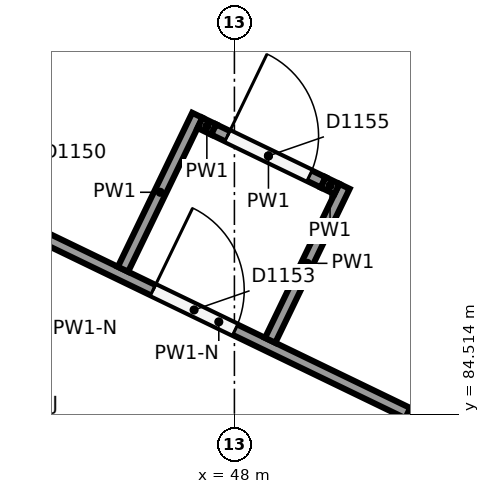
"""IFC4 building model, lengths in metres.
Left out: names, types, materials, properties, quantities, classifications, styles, units other than length and angle.
Written with IfcOpenShell. Run it as: python <this file> out.ifc"""

import sys

from ifc_helpers import new_model, si_unit, direction, frame, frame_2d, origin, place, context, subcontext, project, spatial, rectangle, extrude, element, fill, save


model = new_model("IFC4")
c1 = context("Model", 3, precision=1e-05, world=origin(), true_north=direction((0.0, 1.0)))
c2 = subcontext(c1, "Body", "Model", "MODEL_VIEW")
j1 = project(units=[si_unit("LENGTHUNIT", "METRE"), si_unit("PLANEANGLEUNIT", "RADIAN")], contexts=[c1])
p1 = place(None, origin())
s1 = spatial("IfcSite", under=j1, at=p1, CompositionType="ELEMENT")
p2 = place(p1, origin())
s2 = spatial("IfcBuilding", under=s1, at=p2, CompositionType="ELEMENT")
p3 = place(p2, frame((0.0, 0.0, 12.0)))
s3 = spatial("IfcBuildingStorey", under=s2, at=p3, CompositionType="ELEMENT", Elevation=12.0)
p4 = place(p3, frame((45.308, 86.931, 0.0), z_axis=(0.0, 0.0, 1.0), x_axis=(0.90052298219, -0.434808415911, 0.0)))
e1 = element("IfcWall", 1, at=p4, inside=s3, PredefinedType="PARTITIONING", context=c2, shape_type="SweptSolid", body=[
    extrude(rectangle(XDim=5.522, YDim=0.15, at=frame_2d((2.761, 0.0))), origin(), (0.0, 0.0, 1.0), 3.697),
])
p5 = place(p4, frame((1.8, 0.0, 0.0)))
e2 = element("IfcOpeningElement", 2, at=p5, cuts=e1, PredefinedType="OPENING", context=c2, shape_type="SweptSolid", body=[
    extrude(rectangle(XDim=1.2, YDim=2.1, at=frame_2d((0.6, 1.05))), frame((0.0, 0.085, 0.0), z_axis=(0.0, -1.0, 0.0), x_axis=(1.0, 0.0, 0.0)), (0.0, 0.0, 1.0), 0.17),
])
for number, where, z_axis, x_axis in (
    (3, (46.534, 86.423, 0.0), (0.0, 0.0, 1.0), (0.435, 0.901, 0.0)),
    (4, (48.47, 85.488, 0.0), (0.0, 0.0, 1.0), (0.435, 0.901, 0.0)),
):
    element("IfcWall", number, at=place(p3, frame(where, z_axis=z_axis, x_axis=x_axis)), inside=s3, PredefinedType="PARTITIONING", context=c2, shape_type="SweptSolid", body=[
        extrude(rectangle(XDim=2.25, YDim=0.15, at=frame_2d((1.125, 0.0))), origin(), (0.0, 0.0, 1.0), 5.65),
    ])
p6 = place(p3, frame((47.547, 88.349, 0.0), z_axis=(0.0, 0.0, 1.0), x_axis=(0.900205528442, -0.435465275954, 0.0)))
e5 = element("IfcWall", 5, at=p6, inside=s3, PredefinedType="PARTITIONING", context=c2, shape_type="SweptSolid", body=[
    extrude(rectangle(XDim=0.2, YDim=0.15, at=frame_2d((0.1, 0.0))), origin(), (0.0, 0.0, 1.0), 5.65),
])
p7 = place(p3, frame((47.728, 88.262, 0.0), z_axis=(0.0, 0.0, 1.0), x_axis=(0.90053721394, -0.434778939589, 0.0)))
e6 = element("IfcWall", 6, at=p7, inside=s3, PredefinedType="PARTITIONING", context=c2, shape_type="SweptSolid", body=[
    extrude(rectangle(XDim=1.6, YDim=0.15, at=frame_2d((0.8, 0.0))), origin(), (0.0, 0.0, 1.0), 5.65),
])
p8 = place(p7, frame((0.2, 0.0, 0.0)))
e7 = element("IfcOpeningElement", 7, at=p8, cuts=e6, PredefinedType="OPENING", context=c2, shape_type="SweptSolid", body=[
    extrude(rectangle(XDim=1.2, YDim=2.1, at=frame_2d((0.6, 1.05))), frame((0.0, 0.085, 0.0), z_axis=(0.0, -1.0, 0.0), x_axis=(1.0, 0.0, 0.0)), (0.0, 0.0, 1.0), 0.17),
])
p9 = place(p3, frame((49.168, 87.566, 0.0), z_axis=(0.0, 0.0, 1.0), x_axis=(0.900205528442, -0.435465275954, 0.0)))
e8 = element("IfcWall", 8, at=p9, inside=s3, PredefinedType="PARTITIONING", context=c2, shape_type="SweptSolid", body=[
    extrude(rectangle(XDim=0.2, YDim=0.15, at=frame_2d((0.1, 0.0))), origin(), (0.0, 0.0, 1.0), 5.65),
])
p10 = place(p5, origin())
e9 = element("IfcDoor", 9, at=p10, inside=s3, OperationType="SINGLE_SWING_LEFT", PredefinedType="DOOR", context=c2, shape_type="SweptSolid", body=[
    extrude(rectangle(XDim=1.2, YDim=2.1, at=frame_2d((0.6, 1.05))), frame((0.0, 0.025, 0.0), z_axis=(0.0, -1.0, 0.0), x_axis=(1.0, 0.0, 0.0)), (0.0, 0.0, 1.0), 0.05),
])
fill(e2, e9)
p11 = place(p8, origin())
e10 = element("IfcDoor", 10, at=p11, inside=s3, OperationType="SINGLE_SWING_LEFT", PredefinedType="DOOR", context=c2, shape_type="SweptSolid", body=[
    extrude(rectangle(XDim=1.2, YDim=2.1, at=frame_2d((0.6, 1.05))), frame((0.0, 0.025, 0.0), z_axis=(0.0, -1.0, 0.0), x_axis=(1.0, 0.0, 0.0)), (0.0, 0.0, 1.0), 0.05),
])
fill(e7, e10)
save(model, sys.argv[1])
